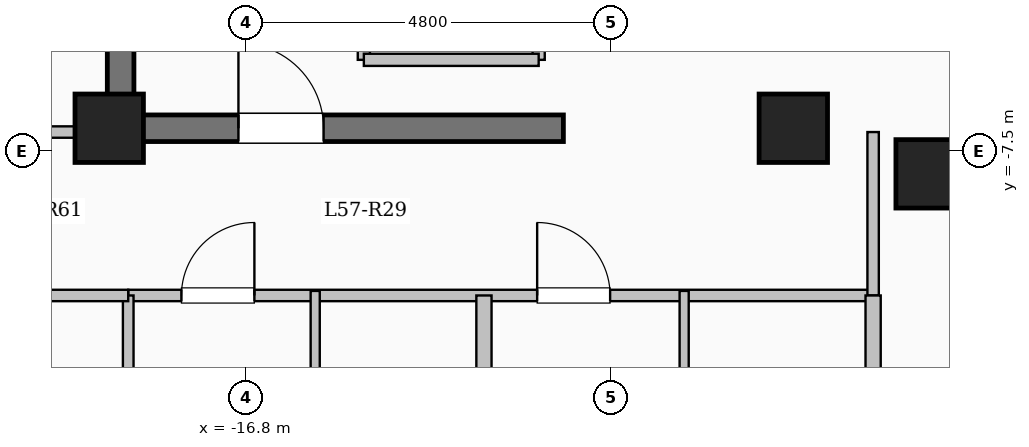
"""IFC4 building model, lengths in metres.
Left out: names, types, materials, properties, quantities, classifications, styles, units other than length and angle.
Written with IfcOpenShell. Run it as: python <this file> out.ifc"""

import sys

from ifc_helpers import new_model, si_unit, direction, frame, frame_2d, origin, origin_2d, place, context, subcontext, project, spatial, rectangle, extrude, element, fill, save


model = new_model("IFC4")
c1 = context("Model", 3, precision=1e-05, world=origin(), true_north=direction((0.0, 1.0)))
c2 = subcontext(c1, "Body", "Model", "MODEL_VIEW")
j1 = project(units=[si_unit("LENGTHUNIT", "METRE"), si_unit("PLANEANGLEUNIT", "RADIAN")], contexts=[c1])
p1 = place(None, origin())
s1 = spatial("IfcSite", under=j1, at=p1, CompositionType="ELEMENT")
p2 = place(p1, origin())
s2 = spatial("IfcBuilding", under=s1, at=p2, CompositionType="ELEMENT")
p3 = place(p2, frame((0.0, 0.0, 210.35)))
s3 = spatial("IfcBuildingStorey", under=s2, at=p3, CompositionType="ELEMENT", Elevation=210.35)
for number, where, z_axis, x_axis in (
    (1, (-7.8, -7.8, 0.0), (0.0, 0.0, 1.0), (1.0, 0.0, 0.0)),
    (2, (-9.6, -7.2, 0.0), (0.0, 0.0, 1.0), (1.0, 0.0, 0.0)),
    (3, (-18.6, -7.2, 0.0), (0.0, 0.0, 1.0), (1.0, 0.0, 0.0)),
):
    element("IfcColumn", number, at=place(p3, frame(where, z_axis=z_axis, x_axis=x_axis)), inside=s3, PredefinedType="COLUMN", context=c2, shape_type="SweptSolid", body=[
        extrude(rectangle(XDim=0.9, YDim=0.9, at=origin_2d()), origin(), (0.0, 0.0, 1.0), 3.35),
    ])
p4 = place(p3, frame((-15.25, -6.3, 0.0), z_axis=(0.0, 0.0, 1.0), x_axis=(0.0, 1.0, 0.0)))
e4 = element("IfcWall", 4, at=p4, inside=s3, PredefinedType="SOLIDWALL", context=c2, shape_type="SweptSolid", body=[
    extrude(rectangle(XDim=2.6, YDim=0.16, at=frame_2d((1.3, 0.0))), origin(), (0.0, 0.0, 1.0), 3.1),
])
p5 = place(p4, frame((0.75, 0.0, 0.0)))
e5 = element("IfcOpeningElement", 5, at=p5, cuts=e4, PredefinedType="OPENING", context=c2, shape_type="SweptSolid", body=[
    extrude(rectangle(XDim=1.1, YDim=2.15, at=frame_2d((0.55, 1.075))), frame((0.0, 0.09, 0.0), z_axis=(0.0, -1.0, 0.0), x_axis=(1.0, 0.0, 0.0)), (0.0, 0.0, 1.0), 0.18),
])
p6 = place(p3, frame((-12.95, -6.3, 0.0), z_axis=(0.0, 0.0, 1.0), x_axis=(0.0, 1.0, 0.0)))
e6 = element("IfcWall", 6, at=p6, inside=s3, PredefinedType="SOLIDWALL", context=c2, shape_type="SweptSolid", body=[
    extrude(rectangle(XDim=2.6, YDim=0.16, at=frame_2d((1.3, 0.0))), origin(), (0.0, 0.0, 1.0), 3.1),
])
p7 = place(p3, frame((-15.25, -6.3, 0.0), z_axis=(0.0, 0.0, 1.0), x_axis=(1.0, 0.0, 0.0)))
e7 = element("IfcWall", 7, at=p7, inside=s3, PredefinedType="SOLIDWALL", context=c2, shape_type="SweptSolid", body=[
    extrude(rectangle(XDim=2.3, YDim=0.16, at=frame_2d((1.15, 0.0))), origin(), (0.0, 0.0, 1.0), 3.1),
])
p8 = place(p3, frame((-18.45, -7.375, 0.0), z_axis=(0.0, 0.0, 1.0), x_axis=(0.0, 1.0, 0.0)))
e8 = element("IfcWall", 8, at=p8, inside=s3, PredefinedType="SHEAR", context=c2, shape_type="SweptSolid", body=[
    extrude(rectangle(XDim=14.05, YDim=0.35, at=frame_2d((7.025, 0.0))), origin(), (0.0, 0.0, 1.0), 3.35),
])
p9 = place(p3, frame((-18.625, -7.2, 0.0), z_axis=(0.0, 0.0, 1.0), x_axis=(1.0, 0.0, 0.0)))
e9 = element("IfcWall", 9, at=p9, inside=s3, PredefinedType="SHEAR", context=c2, shape_type="SweptSolid", body=[
    extrude(rectangle(XDim=6.0, YDim=0.35, at=frame_2d((3.0, 0.0))), origin(), (0.0, 0.0, 1.0), 3.35),
])
p10 = place(p9, frame((1.725, 0.0, 0.0)))
e10 = element("IfcOpeningElement", 10, at=p10, cuts=e9, PredefinedType="OPENING", context=c2, shape_type="SweptSolid", body=[
    extrude(rectangle(XDim=1.12, YDim=2.15, at=frame_2d((0.56, 1.075))), frame((0.0, 0.185, 0.0), z_axis=(0.0, -1.0, 0.0), x_axis=(1.0, 0.0, 0.0)), (0.0, 0.0, 1.0), 0.37),
])
p11 = place(p3, frame((-18.35, -9.4, 0.0), z_axis=(0.0, 0.0, 1.0), x_axis=(1.0, 0.0, 0.0)))
e11 = element("IfcWall", 11, at=p11, inside=s3, PredefinedType="PARTITIONING", context=c2, shape_type="SweptSolid", body=[
    extrude(rectangle(XDim=9.8, YDim=0.15, at=frame_2d((4.9, 0.0))), origin(), (0.0, 0.0, 1.0), 3.1),
])
p12 = place(p11, frame((0.7, 0.0, 0.0)))
e12 = element("IfcOpeningElement", 12, at=p12, cuts=e11, PredefinedType="OPENING", context=c2, shape_type="SweptSolid", body=[
    extrude(rectangle(XDim=0.96, YDim=2.15, at=frame_2d((0.48, 1.075))), frame((0.0, 0.085, 0.0), z_axis=(0.0, -1.0, 0.0), x_axis=(1.0, 0.0, 0.0)), (0.0, 0.0, 1.0), 0.17),
])
p13 = place(p11, frame((5.38, 0.0, 0.0)))
e13 = element("IfcOpeningElement", 13, at=p13, cuts=e11, PredefinedType="OPENING", context=c2, shape_type="SweptSolid", body=[
    extrude(rectangle(XDim=0.96, YDim=2.15, at=frame_2d((0.48, 1.075))), frame((0.0, 0.085, 0.0), z_axis=(0.0, -1.0, 0.0), x_axis=(1.0, 0.0, 0.0)), (0.0, 0.0, 1.0), 0.17),
])
p14 = place(p3, frame((-8.55, -9.4, 0.0), z_axis=(0.0, 0.0, 1.0), x_axis=(0.0, 1.0, 0.0)))
e14 = element("IfcWall", 14, at=p14, inside=s3, PredefinedType="PARTITIONING", context=c2, shape_type="SweptSolid", body=[
    extrude(rectangle(XDim=2.15, YDim=0.15, at=frame_2d((1.075, 0.0))), origin(), (0.0, 0.0, 1.0), 3.1),
])
p15 = place(p3, frame((-13.67, -20.9, 0.0), z_axis=(0.0, 0.0, 1.0), x_axis=(0.0, 1.0, 0.0)))
e15 = element("IfcWall", 15, at=p15, inside=s3, PredefinedType="SOLIDWALL", context=c2, shape_type="SweptSolid", body=[
    extrude(rectangle(XDim=11.5, YDim=0.2, at=frame_2d((5.75, 0.0))), origin(), (0.0, 0.0, 1.0), 3.1),
])
p16 = place(p3, frame((-15.89, -12.56, 0.0), z_axis=(0.0, 0.0, 1.0), x_axis=(0.0, 1.0, 0.0)))
e16 = element("IfcWall", 16, at=p16, inside=s3, PredefinedType="PARTITIONING", context=c2, shape_type="SweptSolid", body=[
    extrude(rectangle(XDim=3.22, YDim=0.12, at=frame_2d((1.61, 0.0))), origin(), (0.0, 0.0, 1.0), 3.1),
])
p17 = place(p16, frame((1.14, 0.0, 0.0)))
e17 = element("IfcOpeningElement", 17, at=p17, cuts=e16, PredefinedType="OPENING", context=c2, shape_type="SweptSolid", body=[
    extrude(rectangle(XDim=0.88, YDim=2.1, at=frame_2d((0.44, 1.05))), frame((0.0, 0.07, 0.0), z_axis=(0.0, -1.0, 0.0), x_axis=(1.0, 0.0, 0.0)), (0.0, 0.0, 1.0), 0.14),
])
p18 = place(p3, frame((-11.036, -12.56, 0.0), z_axis=(0.0, 0.0, 1.0), x_axis=(0.0, 1.0, 0.0)))
e18 = element("IfcWall", 18, at=p18, inside=s3, PredefinedType="PARTITIONING", context=c2, shape_type="SweptSolid", body=[
    extrude(rectangle(XDim=3.22, YDim=0.12, at=frame_2d((1.61, 0.0))), origin(), (0.0, 0.0, 1.0), 3.1),
])
p19 = place(p18, frame((1.14, 0.0, 0.0)))
e19 = element("IfcOpeningElement", 19, at=p19, cuts=e18, PredefinedType="OPENING", context=c2, shape_type="SweptSolid", body=[
    extrude(rectangle(XDim=0.88, YDim=2.1, at=frame_2d((0.44, 1.05))), frame((0.0, 0.07, 0.0), z_axis=(0.0, -1.0, 0.0), x_axis=(1.0, 0.0, 0.0)), (0.0, 0.0, 1.0), 0.14),
])
p20 = place(p3, frame((-8.55, -21.504, 0.0), z_axis=(0.0, 0.0, 1.0), x_axis=(0.0, 1.0, 0.0)))
e20 = element("IfcWall", 20, at=p20, inside=s3, PredefinedType="SOLIDWALL", context=c2, shape_type="SweptSolid", body=[
    extrude(rectangle(XDim=12.104, YDim=0.2, at=frame_2d((6.052, 0.0))), origin(), (0.0, 0.0, 1.0), 3.1),
])
p21 = place(p3, frame((-23.58, -7.25, 0.0), z_axis=(0.0, 0.0, 1.0), x_axis=(1.0, 0.0, 0.0)))
e21 = element("IfcWall", 21, at=p21, inside=s3, PredefinedType="PARTITIONING", context=c2, shape_type="SweptSolid", body=[
    extrude(rectangle(XDim=5.13, YDim=0.15, at=frame_2d((2.565, 0.0))), origin(), (0.0, 0.0, 1.0), 3.1),
])
p22 = place(p21, frame((2.18, 0.0, 0.0)))
e22 = element("IfcOpeningElement", 22, at=p22, cuts=e21, PredefinedType="OPENING", context=c2, shape_type="SweptSolid", body=[
    extrude(rectangle(XDim=0.96, YDim=2.15, at=frame_2d((0.48, 1.075))), frame((0.0, 0.085, 0.0), z_axis=(0.0, -1.0, 0.0), x_axis=(1.0, 0.0, 0.0)), (0.0, 0.0, 1.0), 0.17),
])
p23 = place(p3, frame((-18.35, -17.25, 0.0), z_axis=(0.0, 0.0, 1.0), x_axis=(0.0, 1.0, 0.0)))
e23 = element("IfcWall", 23, at=p23, inside=s3, PredefinedType="PARTITIONING", context=c2, shape_type="SweptSolid", body=[
    extrude(rectangle(XDim=7.85, YDim=0.14, at=frame_2d((3.925, 0.0))), origin(), (0.0, 0.0, 1.0), 3.1),
])
p24 = place(p3, frame((-23.58, -9.4, 0.0), z_axis=(0.0, 0.0, 1.0), x_axis=(1.0, 0.0, 0.0)))
e24 = element("IfcWall", 24, at=p24, inside=s3, PredefinedType="PARTITIONING", context=c2, shape_type="SweptSolid", body=[
    extrude(rectangle(XDim=5.23, YDim=0.15, at=frame_2d((2.615, 0.0))), origin(), (0.0, 0.0, 1.0), 3.1),
])
p25 = place(p24, frame((2.14, 0.0, 0.0)))
e25 = element("IfcOpeningElement", 25, at=p25, cuts=e24, PredefinedType="OPENING", context=c2, shape_type="SweptSolid", body=[
    extrude(rectangle(XDim=0.95, YDim=2.15, at=frame_2d((0.475, 1.075))), frame((0.0, 0.085, 0.0), z_axis=(0.0, -1.0, 0.0), x_axis=(1.0, 0.0, 0.0)), (0.0, 0.0, 1.0), 0.17),
])
p26 = place(p10, origin())
e26 = element("IfcDoor", 26, at=p26, inside=s3, OperationType="SINGLE_SWING_LEFT", PredefinedType="DOOR", context=c2, shape_type="SweptSolid", body=[
    extrude(rectangle(XDim=1.12, YDim=2.15, at=frame_2d((0.56, 1.075))), frame((0.0, 0.025, 0.0), z_axis=(0.0, -1.0, 0.0), x_axis=(1.0, 0.0, 0.0)), (0.0, 0.0, 1.0), 0.05),
])
fill(e10, e26)
p27 = place(p12, origin())
e27 = element("IfcDoor", 27, at=p27, inside=s3, OperationType="SINGLE_SWING_RIGHT", PredefinedType="DOOR", context=c2, shape_type="SweptSolid", body=[
    extrude(rectangle(XDim=0.96, YDim=2.15, at=frame_2d((0.48, 1.075))), frame((0.0, 0.025, 0.0), z_axis=(0.0, -1.0, 0.0), x_axis=(1.0, 0.0, 0.0)), (0.0, 0.0, 1.0), 0.05),
])
fill(e12, e27)
p28 = place(p13, origin())
e28 = element("IfcDoor", 28, at=p28, inside=s3, OperationType="SINGLE_SWING_LEFT", PredefinedType="DOOR", context=c2, shape_type="SweptSolid", body=[
    extrude(rectangle(XDim=0.96, YDim=2.15, at=frame_2d((0.48, 1.075))), frame((0.0, 0.025, 0.0), z_axis=(0.0, -1.0, 0.0), x_axis=(1.0, 0.0, 0.0)), (0.0, 0.0, 1.0), 0.05),
])
fill(e13, e28)
save(model, sys.argv[1])
